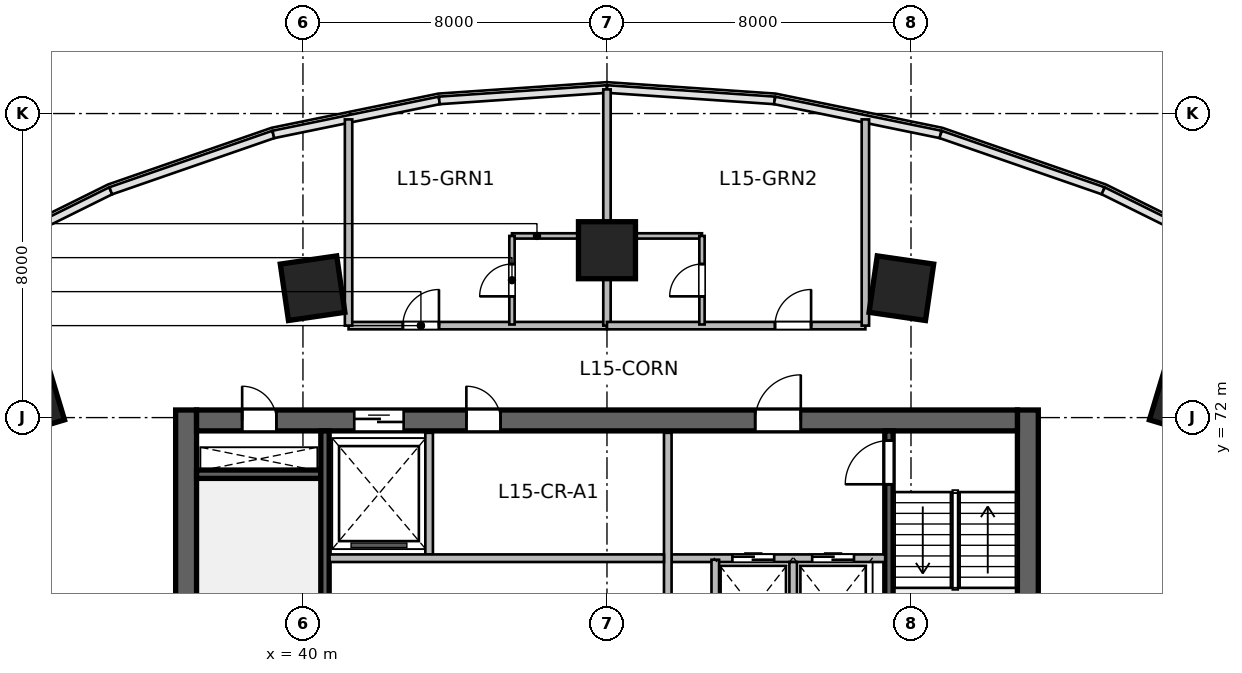
"""IFC4 building model, lengths in metres.
Left out: names, types, materials, properties, quantities, classifications, styles, units other than length and angle.
Written with IfcOpenShell. Run it as: python <this file> out.ifc"""

import sys

from ifc_helpers import new_model, si_unit, direction, frame, frame_2d, origin, origin_2d, place, context, subcontext, project, spatial, rectangle, extrude, source, transform, mapped, element, fill, save


model = new_model("IFC4")
c1 = context("Model", 3, precision=1e-05, world=origin(), true_north=direction((0.0, 1.0)))
c2 = subcontext(c1, "Body", "Model", "MODEL_VIEW")
j1 = project(units=[si_unit("LENGTHUNIT", "METRE"), si_unit("PLANEANGLEUNIT", "RADIAN")], contexts=[c1])
p1 = place(None, origin())
s1 = spatial("IfcSite", under=j1, at=p1, CompositionType="ELEMENT")
p2 = place(p1, origin())
s2 = spatial("IfcBuilding", under=s1, at=p2, CompositionType="ELEMENT")
p3 = place(p2, frame((0.0, 0.0, 67.8)))
s3 = spatial("IfcBuildingStorey", under=s2, at=p3, CompositionType="ELEMENT", Elevation=67.8)
m1 = source(origin(), c2, "Body", "SweptSolid", [
    extrude(rectangle(XDim=12.0, YDim=0.55, at=frame_2d((6.0, 0.0))), origin(), (0.0, 0.0, 1.0), 3.6),
])
for number, where, z_axis, x_axis in (
    (1, (36.925, 60.2, 0.0), (0.0, 0.0, 1.0), (0.0, 1.0, 0.0)),
    (2, (59.075, 60.2, 0.0), (0.0, 0.0, 1.0), (0.0, 1.0, 0.0)),
):
    element("IfcWall", number, at=place(p3, frame(where, z_axis=z_axis, x_axis=x_axis)), inside=s3, PredefinedType="SHEAR", context=c2, shape_type="MappedRepresentation", body=[
        mapped(m1, transform((0.0, 0.0, 0.0), scale=1.0)),
    ])
m2 = source(origin(), c2, "Body", "SweptSolid", [
    extrude(rectangle(XDim=21.6, YDim=0.55, at=frame_2d((10.8, 0.0))), origin(), (0.0, 0.0, 1.0), 3.6),
])
p4 = place(p3, frame((37.2, 71.925, 0.0), z_axis=(0.0, 0.0, 1.0), x_axis=(1.0, 0.0, 0.0)))
e3 = element("IfcWall", 3, at=p4, inside=s3, PredefinedType="SHEAR", context=c2, shape_type="MappedRepresentation", body=[
    mapped(m2, transform((0.0, 0.0, 0.0), scale=1.0)),
])
p5 = place(p4, frame((1.2, 0.0, 0.0)))
e4 = element("IfcOpeningElement", 4, at=p5, cuts=e3, PredefinedType="OPENING", context=c2, shape_type="SweptSolid", body=[
    extrude(rectangle(XDim=0.9, YDim=2.1, at=frame_2d((0.45, 1.05))), frame((0.0, 0.285, 0.0), z_axis=(0.0, -1.0, 0.0), x_axis=(1.0, 0.0, 0.0)), (0.0, 0.0, 1.0), 0.57),
])
p6 = place(p4, frame((14.7, 0.0, 0.0)))
e5 = element("IfcOpeningElement", 5, at=p6, cuts=e3, PredefinedType="OPENING", context=c2, shape_type="SweptSolid", body=[
    extrude(rectangle(XDim=1.2, YDim=2.15, at=frame_2d((0.6, 1.075))), frame((0.0, 0.285, 0.0), z_axis=(0.0, -1.0, 0.0), x_axis=(1.0, 0.0, 0.0)), (0.0, 0.0, 1.0), 0.57),
])
p7 = place(p4, frame((4.15, 0.0, 0.0)))
e6 = element("IfcOpeningElement", 6, at=p7, cuts=e3, PredefinedType="OPENING", context=c2, shape_type="SweptSolid", body=[
    extrude(rectangle(XDim=1.3, YDim=2.15, at=frame_2d((0.65, 1.075))), frame((0.0, 0.285, 0.0), z_axis=(0.0, -1.0, 0.0), x_axis=(1.0, 0.0, 0.0)), (0.0, 0.0, 1.0), 0.57),
])
p8 = place(p4, frame((7.1, 0.0, 0.0)))
e7 = element("IfcOpeningElement", 7, at=p8, cuts=e3, PredefinedType="OPENING", context=c2, shape_type="SweptSolid", body=[
    extrude(rectangle(XDim=0.9, YDim=2.1, at=frame_2d((0.45, 1.05))), frame((0.0, 0.285, 0.0), z_axis=(0.0, -1.0, 0.0), x_axis=(1.0, 0.0, 0.0)), (0.0, 0.0, 1.0), 0.57),
])
m3 = source(origin(), c2, "Body", "SweptSolid", [
    extrude(rectangle(XDim=3.27, YDim=0.22, at=frame_2d((1.635, 0.0))), origin(), (0.0, 0.0, 1.0), 3.6),
])
p9 = place(p3, frame((37.2, 70.51, 0.0), z_axis=(0.0, 0.0, 1.0), x_axis=(1.0, 0.0, 0.0)))
e8 = element("IfcWall", 8, at=p9, inside=s3, PredefinedType="SHEAR", context=c2, shape_type="MappedRepresentation", body=[
    mapped(m3, transform((0.0, 0.0, 0.0), scale=1.0)),
])
m4 = source(origin(), c2, "Body", "SweptSolid", [
    extrude(rectangle(XDim=10.9, YDim=0.22, at=frame_2d((5.45, 0.0))), origin(), (0.0, 0.0, 1.0), 3.6),
])
p10 = place(p3, frame((40.58, 60.75, 0.0), z_axis=(0.0, 0.0, 1.0), x_axis=(0.0, 1.0, 0.0)))
e9 = element("IfcWall", 9, at=p10, inside=s3, PredefinedType="SHEAR", context=c2, shape_type="MappedRepresentation", body=[
    mapped(m4, transform((0.0, 0.0, 0.0), scale=1.0)),
])
p11 = place(p3, frame((55.42, 60.75, 0.0), z_axis=(0.0, 0.0, 1.0), x_axis=(0.0, 1.0, 0.0)))
e10 = element("IfcWall", 10, at=p11, inside=s3, PredefinedType="SHEAR", context=c2, shape_type="MappedRepresentation", body=[
    mapped(m4, transform((0.0, 0.0, 0.0), scale=1.0)),
])
p12 = place(p11, frame((9.495, 0.0, 0.0)))
e11 = element("IfcOpeningElement", 11, at=p12, cuts=e10, PredefinedType="OPENING", context=c2, shape_type="SweptSolid", body=[
    extrude(rectangle(XDim=1.15, YDim=2.15, at=frame_2d((0.575, 1.075))), frame((0.0, 0.12, 0.0), z_axis=(0.0, -1.0, 0.0), x_axis=(1.0, 0.0, 0.0)), (0.0, 0.0, 1.0), 0.24),
])
m5 = source(origin(), c2, "Body", "SweptSolid", [
    extrude(rectangle(XDim=1.5, YDim=1.5, at=origin_2d()), origin(), (0.0, 0.0, 1.0), 3.6),
])
for number, where, z_axis, x_axis in (
    (12, (32.791, 72.442, 0.0), (0.0, 0.0, 1.0), (-0.289, 0.957, 0.0)),
    (13, (40.253, 75.404, 0.0), (0.0, 0.0, 1.0), (-0.143, 0.99, 0.0)),
    (14, (48.0, 76.404, 0.0), (0.0, 0.0, 1.0), (0.0, 1.0, 0.0)),
    (15, (55.747, 75.404, 0.0), (0.0, 0.0, 1.0), (0.143, 0.99, 0.0)),
    (16, (63.209, 72.442, 0.0), (0.0, 0.0, 1.0), (0.289, 0.957, 0.0)),
):
    element("IfcColumn", number, at=place(p3, frame(where, z_axis=z_axis, x_axis=x_axis)), inside=s3, PredefinedType="COLUMN", context=c2, shape_type="MappedRepresentation", body=[
        mapped(m5, transform((0.0, 0.0, 0.0), scale=1.0)),
    ])
m6 = source(origin(), c2, "Body", "SweptSolid", [
    extrude(rectangle(XDim=5.62, YDim=0.2, at=frame_2d((2.81, 0.0))), origin(), (0.0, 0.0, 1.0), 3.36),
])
p13 = place(p3, frame((49.7, 68.3, 0.0), z_axis=(0.0, 0.0, 1.0), x_axis=(1.0, 0.0, 0.0)))
e17 = element("IfcWall", 17, at=p13, inside=s3, PredefinedType="SOLIDWALL", context=c2, shape_type="MappedRepresentation", body=[
    mapped(m6, transform((0.0, 0.0, 0.0), scale=1.0)),
])
p14 = place(p13, frame((1.6, 0.0, 0.0)))
e18 = element("IfcOpeningElement", 18, at=p14, cuts=e17, PredefinedType="OPENING", context=c2, shape_type="SweptSolid", body=[
    extrude(rectangle(XDim=1.1, YDim=2.15, at=frame_2d((0.55, 1.075))), frame((0.0, 0.11, 0.0), z_axis=(0.0, -1.0, 0.0), x_axis=(1.0, 0.0, 0.0)), (0.0, 0.0, 1.0), 0.22),
])
p15 = place(p13, frame((3.7, 0.0, 0.0)))
e19 = element("IfcOpeningElement", 19, at=p15, cuts=e17, PredefinedType="OPENING", context=c2, shape_type="SweptSolid", body=[
    extrude(rectangle(XDim=1.1, YDim=2.15, at=frame_2d((0.55, 1.075))), frame((0.0, 0.11, 0.0), z_axis=(0.0, -1.0, 0.0), x_axis=(1.0, 0.0, 0.0)), (0.0, 0.0, 1.0), 0.22),
])
m7 = source(origin(), c2, "Body", "SweptSolid", [
    extrude(rectangle(XDim=5.8, YDim=0.2, at=frame_2d((2.9, 0.0))), origin(), (0.0, 0.0, 1.0), 3.36),
])
p16 = place(p3, frame((49.6, 65.8, 0.0), z_axis=(0.0, 0.0, 1.0), x_axis=(0.0, 1.0, 0.0)))
e20 = element("IfcWall", 20, at=p16, inside=s3, PredefinedType="SOLIDWALL", context=c2, shape_type="MappedRepresentation", body=[
    mapped(m7, transform((0.0, 0.0, 0.0), scale=1.0)),
])
m8 = source(origin(), c2, "Body", "SweptSolid", [
    extrude(rectangle(XDim=2.58, YDim=0.2, at=frame_2d((1.29, 0.0))), origin(), (0.0, 0.0, 1.0), 3.36),
])
p17 = place(p3, frame((50.85, 65.68, 0.0), z_axis=(0.0, 0.0, 1.0), x_axis=(0.0, 1.0, 0.0)))
e21 = element("IfcWall", 21, at=p17, inside=s3, PredefinedType="SOLIDWALL", context=c2, shape_type="MappedRepresentation", body=[
    mapped(m8, transform((0.0, 0.0, 0.0), scale=1.0)),
])
m9 = source(origin(), c2, "Body", "SweptSolid", [
    extrude(rectangle(XDim=2.4, YDim=0.2, at=frame_2d((1.2, 0.0))), origin(), (0.0, 0.0, 1.0), 3.36),
])
p18 = place(p3, frame((52.9, 65.8, 0.0), z_axis=(0.0, 0.0, 1.0), x_axis=(0.0, 1.0, 0.0)))
e22 = element("IfcWall", 22, at=p18, inside=s3, PredefinedType="SOLIDWALL", context=c2, shape_type="MappedRepresentation", body=[
    mapped(m9, transform((0.0, 0.0, 0.0), scale=1.0)),
])
m10 = source(origin(), c2, "Body", "SweptSolid", [
    extrude(rectangle(XDim=3.2, YDim=0.2, at=frame_2d((1.6, 0.0))), origin(), (0.0, 0.0, 1.0), 3.36),
])
p19 = place(p3, frame((43.32, 68.4, 0.0), z_axis=(0.0, 0.0, 1.0), x_axis=(0.0, 1.0, 0.0)))
e23 = element("IfcWall", 23, at=p19, inside=s3, PredefinedType="SOLIDWALL", context=c2, shape_type="MappedRepresentation", body=[
    mapped(m10, transform((0.0, 0.0, 0.0), scale=1.0)),
])
m11 = source(origin(), c2, "Body", "SweptSolid", [
    extrude(rectangle(XDim=8.8, YDim=0.2, at=frame_2d((4.4, 0.0))), origin(), (0.0, 0.0, 1.0), 3.36),
])
p20 = place(p3, frame((40.7, 68.3, 0.0), z_axis=(0.0, 0.0, 1.0), x_axis=(1.0, 0.0, 0.0)))
e24 = element("IfcWall", 24, at=p20, inside=s3, PredefinedType="SOLIDWALL", context=c2, shape_type="MappedRepresentation", body=[
    mapped(m11, transform((0.0, 0.0, 0.0), scale=1.0)),
])
m12 = source(origin(), c2, "Body", "SweptSolid", [
    extrude(rectangle(XDim=6.8, YDim=0.195, at=frame_2d((3.4, 0.0))), origin(), (0.0, 0.0, 1.0), 3.36),
])
p21 = place(p3, frame((41.2, 74.42, 0.0), z_axis=(0.0, 0.0, 1.0), x_axis=(1.0, 0.0, 0.0)))
e25 = element("IfcWall", 25, at=p21, inside=s3, PredefinedType="PARTITIONING", context=c2, shape_type="MappedRepresentation", body=[
    mapped(m12, transform((0.0, 0.0, 0.0), scale=1.0)),
])
p22 = place(p21, frame((1.429, 0.0, 0.0)))
e26 = element("IfcOpeningElement", 26, at=p22, cuts=e25, PredefinedType="OPENING", context=c2, shape_type="SweptSolid", body=[
    extrude(rectangle(XDim=0.95, YDim=2.15, at=frame_2d((0.475, 1.075))), frame((0.0, 0.107, 0.0), z_axis=(0.0, -1.0, 0.0), x_axis=(1.0, 0.0, 0.0)), (0.0, 0.0, 1.0), 0.215),
])
m13 = source(origin(), c2, "Body", "SweptSolid", [
    extrude(rectangle(XDim=6.216, YDim=0.195, at=frame_2d((3.108, 0.0))), origin(), (0.0, 0.0, 1.0), 2.644),
])
p23 = place(p3, frame((48.0, 74.42, 0.0), z_axis=(0.0, 0.0, 1.0), x_axis=(0.0, 1.0, 0.0)))
e27 = element("IfcWall", 27, at=p23, inside=s3, PredefinedType="PARTITIONING", context=c2, shape_type="MappedRepresentation", body=[
    mapped(m13, transform((0.0, 0.0, 0.0), scale=1.0)),
])
m14 = source(origin(), c2, "Body", "SweptSolid", [
    extrude(rectangle(XDim=5.426, YDim=0.195, at=frame_2d((2.713, 0.0))), origin(), (0.0, 0.0, 1.0), 3.36),
])
p24 = place(p3, frame((41.2, 74.42, 0.0), z_axis=(0.0, 0.0, 1.0), x_axis=(0.0, 1.0, 0.0)))
e28 = element("IfcWall", 28, at=p24, inside=s3, PredefinedType="PARTITIONING", context=c2, shape_type="MappedRepresentation", body=[
    mapped(m14, transform((0.0, 0.0, 0.0), scale=1.0)),
])
m15 = source(origin(), c2, "Body", "SweptSolid", [
    extrude(rectangle(XDim=2.35, YDim=0.14, at=frame_2d((1.175, 0.0))), origin(), (0.0, 0.0, 1.0), 3.36),
])
p25 = place(p3, frame((45.5, 76.78, 0.0), z_axis=(0.0, 0.0, 1.0), x_axis=(1.0, 0.0, 0.0)))
e29 = element("IfcWall", 29, at=p25, inside=s3, PredefinedType="PARTITIONING", context=c2, shape_type="MappedRepresentation", body=[
    mapped(m15, transform((0.0, 0.0, 0.0), scale=1.0)),
])
m16 = source(origin(), c2, "Body", "SweptSolid", [
    extrude(rectangle(XDim=2.33, YDim=0.14, at=frame_2d((1.165, 0.0))), origin(), (0.0, 0.0, 1.0), 3.36),
])
p26 = place(p3, frame((45.5, 74.45, 0.0), z_axis=(0.0, 0.0, 1.0), x_axis=(0.0, 1.0, 0.0)))
e30 = element("IfcWall", 30, at=p26, inside=s3, PredefinedType="PARTITIONING", context=c2, shape_type="MappedRepresentation", body=[
    mapped(m16, transform((0.0, 0.0, 0.0), scale=1.0)),
])
p27 = place(p26, frame((0.74, 0.0, 0.0)))
e31 = element("IfcOpeningElement", 31, at=p27, cuts=e30, PredefinedType="OPENING", context=c2, shape_type="SweptSolid", body=[
    extrude(rectangle(XDim=0.85, YDim=2.05, at=frame_2d((0.425, 1.025))), frame((0.0, 0.08, 0.0), z_axis=(0.0, -1.0, 0.0), x_axis=(1.0, 0.0, 0.0)), (0.0, 0.0, 1.0), 0.16),
])
p28 = place(p3, frame((48.0, 74.42, 0.0), z_axis=(0.0, 0.0, 1.0), x_axis=(1.0, 0.0, 0.0)))
e32 = element("IfcWall", 32, at=p28, inside=s3, PredefinedType="PARTITIONING", context=c2, shape_type="MappedRepresentation", body=[
    mapped(m12, transform((0.0, 0.0, 0.0), scale=1.0)),
])
p29 = place(p28, frame((4.421, 0.0, 0.0)))
e33 = element("IfcOpeningElement", 33, at=p29, cuts=e32, PredefinedType="OPENING", context=c2, shape_type="SweptSolid", body=[
    extrude(rectangle(XDim=0.95, YDim=2.15, at=frame_2d((0.475, 1.075))), frame((0.0, 0.107, 0.0), z_axis=(0.0, -1.0, 0.0), x_axis=(1.0, 0.0, 0.0)), (0.0, 0.0, 1.0), 0.215),
])
p30 = place(p3, frame((54.8, 74.42, 0.0), z_axis=(0.0, 0.0, 1.0), x_axis=(0.0, 1.0, 0.0)))
e34 = element("IfcWall", 34, at=p30, inside=s3, PredefinedType="PARTITIONING", context=c2, shape_type="MappedRepresentation", body=[
    mapped(m14, transform((0.0, 0.0, 0.0), scale=1.0)),
])
p31 = place(p3, frame((48.15, 76.78, 0.0), z_axis=(0.0, 0.0, 1.0), x_axis=(1.0, 0.0, 0.0)))
e35 = element("IfcWall", 35, at=p31, inside=s3, PredefinedType="PARTITIONING", context=c2, shape_type="MappedRepresentation", body=[
    mapped(m15, transform((0.0, 0.0, 0.0), scale=1.0)),
])
p32 = place(p3, frame((50.5, 74.45, 0.0), z_axis=(0.0, 0.0, 1.0), x_axis=(0.0, 1.0, 0.0)))
e36 = element("IfcWall", 36, at=p32, inside=s3, PredefinedType="PARTITIONING", context=c2, shape_type="MappedRepresentation", body=[
    mapped(m16, transform((0.0, 0.0, 0.0), scale=1.0)),
])
p33 = place(p32, frame((0.74, 0.0, 0.0)))
e37 = element("IfcOpeningElement", 37, at=p33, cuts=e36, PredefinedType="OPENING", context=c2, shape_type="SweptSolid", body=[
    extrude(rectangle(XDim=0.85, YDim=2.05, at=frame_2d((0.425, 1.025))), frame((0.0, 0.08, 0.0), z_axis=(0.0, -1.0, 0.0), x_axis=(1.0, 0.0, 0.0)), (0.0, 0.0, 1.0), 0.16),
])
m17 = source(origin(), c2, "Body", "SweptSolid", [
    extrude(rectangle(XDim=0.9, YDim=2.1, at=frame_2d((0.45, 1.05))), frame((0.0, 0.025, 0.0), z_axis=(0.0, -1.0, 0.0), x_axis=(1.0, 0.0, 0.0)), (0.0, 0.0, 1.0), 0.05),
])
p34 = place(p5, origin())
e38 = element("IfcDoor", 38, at=p34, inside=s3, OperationType="SINGLE_SWING_LEFT", PredefinedType="DOOR", context=c2, shape_type="MappedRepresentation", body=[
    mapped(m17, transform((0.0, 0.0, 0.0), scale=1.0)),
])
fill(e4, e38)
m18 = source(origin(), c2, "Body", "SweptSolid", [
    extrude(rectangle(XDim=1.15, YDim=2.15, at=frame_2d((0.575, 1.075))), frame((0.0, 0.025, 0.0), z_axis=(0.0, -1.0, 0.0), x_axis=(1.0, 0.0, 0.0)), (0.0, 0.0, 1.0), 0.05),
])
p35 = place(p12, origin())
e39 = element("IfcDoor", 39, at=p35, inside=s3, OperationType="SINGLE_SWING_LEFT", PredefinedType="DOOR", context=c2, shape_type="MappedRepresentation", body=[
    mapped(m18, transform((0.0, 0.0, 0.0), scale=1.0)),
])
fill(e11, e39)
m19 = source(origin(), c2, "Body", "SweptSolid", [
    extrude(rectangle(XDim=1.2, YDim=2.15, at=frame_2d((0.6, 1.075))), frame((0.0, 0.025, 0.0), z_axis=(0.0, -1.0, 0.0), x_axis=(1.0, 0.0, 0.0)), (0.0, 0.0, 1.0), 0.05),
])
p36 = place(p6, origin())
e40 = element("IfcDoor", 40, at=p36, inside=s3, OperationType="SINGLE_SWING_RIGHT", PredefinedType="DOOR", context=c2, shape_type="MappedRepresentation", body=[
    mapped(m19, transform((0.0, 0.0, 0.0), scale=1.0)),
])
fill(e5, e40)
m20 = source(origin(), c2, "Body", "SweptSolid", [
    extrude(rectangle(XDim=1.1, YDim=2.15, at=frame_2d((0.55, 1.075))), frame((0.0, 0.025, 0.0), z_axis=(0.0, -1.0, 0.0), x_axis=(1.0, 0.0, 0.0)), (0.0, 0.0, 1.0), 0.05),
])
p37 = place(p14, origin())
e41 = element("IfcDoor", 41, at=p37, inside=s3, OperationType="DOUBLE_DOOR_SLIDING", PredefinedType="DOOR", context=c2, shape_type="MappedRepresentation", body=[
    mapped(m20, transform((0.0, 0.0, 0.0), scale=1.0)),
])
fill(e18, e41)
p38 = place(p15, origin())
e42 = element("IfcDoor", 42, at=p38, inside=s3, OperationType="DOUBLE_DOOR_SLIDING", PredefinedType="DOOR", context=c2, shape_type="MappedRepresentation", body=[
    mapped(m20, transform((0.0, 0.0, 0.0), scale=1.0)),
])
fill(e19, e42)
m21 = source(origin(), c2, "Body", "SweptSolid", [
    extrude(rectangle(XDim=1.3, YDim=2.15, at=frame_2d((0.65, 1.075))), frame((0.0, 0.025, 0.0), z_axis=(0.0, -1.0, 0.0), x_axis=(1.0, 0.0, 0.0)), (0.0, 0.0, 1.0), 0.05),
])
p39 = place(p7, origin())
e43 = element("IfcDoor", 43, at=p39, inside=s3, OperationType="DOUBLE_DOOR_SLIDING", PredefinedType="DOOR", context=c2, shape_type="MappedRepresentation", body=[
    mapped(m21, transform((0.0, 0.0, 0.0), scale=1.0)),
])
fill(e6, e43)
p40 = place(p8, origin())
e44 = element("IfcDoor", 44, at=p40, inside=s3, OperationType="SINGLE_SWING_LEFT", PredefinedType="DOOR", context=c2, shape_type="MappedRepresentation", body=[
    mapped(m17, transform((0.0, 0.0, 0.0), scale=1.0)),
])
fill(e7, e44)
m22 = source(origin(), c2, "Body", "SweptSolid", [
    extrude(rectangle(XDim=0.95, YDim=2.15, at=frame_2d((0.475, 1.075))), frame((0.0, 0.025, 0.0), z_axis=(0.0, -1.0, 0.0), x_axis=(1.0, 0.0, 0.0)), (0.0, 0.0, 1.0), 0.05),
])
p41 = place(p22, origin())
e45 = element("IfcDoor", 45, at=p41, inside=s3, OperationType="SINGLE_SWING_RIGHT", PredefinedType="DOOR", context=c2, shape_type="MappedRepresentation", body=[
    mapped(m22, transform((0.0, 0.0, 0.0), scale=1.0)),
])
fill(e26, e45)
m23 = source(origin(), c2, "Body", "SweptSolid", [
    extrude(rectangle(XDim=0.85, YDim=2.05, at=frame_2d((0.425, 1.025))), frame((0.0, 0.025, 0.0), z_axis=(0.0, -1.0, 0.0), x_axis=(1.0, 0.0, 0.0)), (0.0, 0.0, 1.0), 0.05),
])
p42 = place(p27, origin())
e46 = element("IfcDoor", 46, at=p42, inside=s3, OperationType="SINGLE_SWING_LEFT", PredefinedType="DOOR", context=c2, shape_type="MappedRepresentation", body=[
    mapped(m23, transform((0.0, 0.0, 0.0), scale=1.0)),
])
fill(e31, e46)
p43 = place(p29, origin())
e47 = element("IfcDoor", 47, at=p43, inside=s3, OperationType="SINGLE_SWING_RIGHT", PredefinedType="DOOR", context=c2, shape_type="MappedRepresentation", body=[
    mapped(m22, transform((0.0, 0.0, 0.0), scale=1.0)),
])
fill(e33, e47)
p44 = place(p33, origin())
e48 = element("IfcDoor", 48, at=p44, inside=s3, OperationType="SINGLE_SWING_LEFT", PredefinedType="DOOR", context=c2, shape_type="MappedRepresentation", body=[
    mapped(m23, transform((0.0, 0.0, 0.0), scale=1.0)),
])
fill(e37, e48)
save(model, sys.argv[1])
